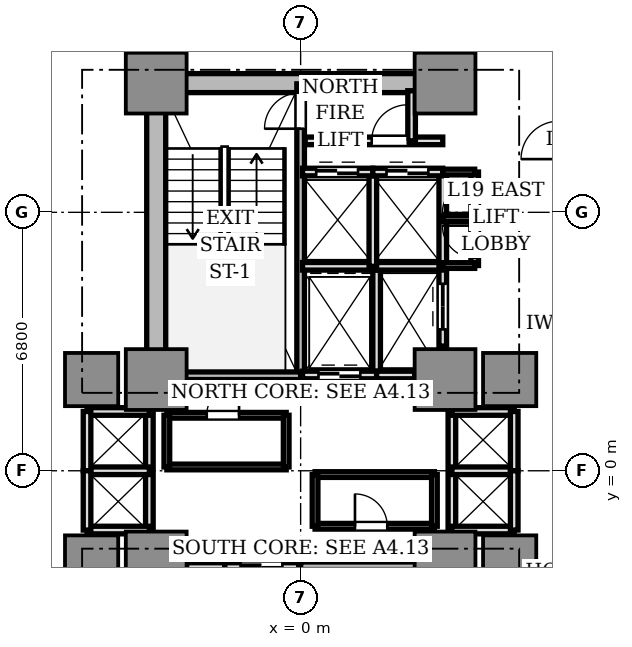
"""IFC4 building model, lengths in metres.
Left out: names, types, materials, properties, quantities, classifications, styles, units other than length and angle.
Written with IfcOpenShell. Run it as: python <this file> out.ifc"""

import sys

from ifc_helpers import new_model, si_unit, direction, frame, frame_2d, origin, origin_2d, place, context, subcontext, project, spatial, rectangle, extrude, source, transform, mapped, element, fill, save


model = new_model("IFC4")
c1 = context("Model", 3, precision=1e-05, world=origin(), true_north=direction((0.0, 1.0)))
c2 = subcontext(c1, "Body", "Model", "MODEL_VIEW")
j1 = project(units=[si_unit("LENGTHUNIT", "METRE"), si_unit("PLANEANGLEUNIT", "RADIAN")], contexts=[c1])
p1 = place(None, origin())
s1 = spatial("IfcSite", under=j1, at=p1, CompositionType="ELEMENT")
p2 = place(p1, origin())
s2 = spatial("IfcBuilding", under=s1, at=p2, CompositionType="ELEMENT")
p3 = place(p2, frame((0.0, 0.0, 71.15)))
s3 = spatial("IfcBuildingStorey", under=s2, at=p3, CompositionType="ELEMENT", Elevation=71.15)
p4 = place(p3, frame((-3.55, 10.2, 0.0), z_axis=(0.0, 0.0, 1.0), x_axis=(1.0, 0.0, 0.0)))
e1 = element("IfcWall", 1, at=p4, inside=s3, PredefinedType="SHEAR", context=c2, shape_type="SweptSolid", body=[
    extrude(rectangle(XDim=7.1, YDim=0.5, at=frame_2d((3.55, 0.0))), origin(), (0.0, 0.0, 1.0), 3.03),
])
p5 = place(p3, frame((-3.8, 2.85, 0.0), z_axis=(0.0, 0.0, 1.0), x_axis=(0.0, 1.0, 0.0)))
e2 = element("IfcWall", 2, at=p5, inside=s3, PredefinedType="SHEAR", context=c2, shape_type="SweptSolid", body=[
    extrude(rectangle(XDim=6.9, YDim=0.5, at=frame_2d((3.45, 0.0))), origin(), (0.0, 0.0, 1.0), 3.03),
])
m1 = source(origin(), c2, "Body", "SweptSolid", [
    extrude(rectangle(XDim=1.6, YDim=1.6, at=origin_2d()), origin(), (0.0, 0.0, 1.0), 3.03),
])
for number, where, z_axis, x_axis in (
    (3, (-3.8, 2.4, 0.0), (0.0, 0.0, 1.0), (1.0, 0.0, 0.0)),
    (4, (3.8, 2.4, 0.0), (0.0, 0.0, 1.0), (1.0, 0.0, 0.0)),
    (5, (-3.8, 10.2, 0.0), (0.0, 0.0, 1.0), (1.0, 0.0, 0.0)),
    (6, (3.8, 10.2, 0.0), (0.0, 0.0, 1.0), (1.0, 0.0, 0.0)),
    (7, (-3.8, -2.4, 0.0), (0.0, 0.0, 1.0), (1.0, 0.0, 0.0)),
    (8, (3.8, -2.4, 0.0), (0.0, 0.0, 1.0), (1.0, 0.0, 0.0)),
):
    element("IfcColumn", number, at=place(p3, frame(where, z_axis=z_axis, x_axis=x_axis)), inside=s3, PredefinedType="COLUMN", context=c2, shape_type="MappedRepresentation", body=[
        mapped(m1, transform((0.0, 0.0, 0.0), scale=1.0)),
    ])
m2 = source(origin(), c2, "Body", "SweptSolid", [
    extrude(rectangle(XDim=1.4, YDim=1.4, at=origin_2d()), origin(), (0.0, 0.0, 1.0), 3.03),
])
for number, where, z_axis, x_axis in (
    (9, (5.5, 2.4, 0.0), (0.0, 0.0, 1.0), (1.0, 0.0, 0.0)),
    (10, (-5.5, 2.4, 0.0), (0.0, 0.0, 1.0), (1.0, 0.0, 0.0)),
    (11, (5.5, -2.4, 0.0), (0.0, 0.0, 1.0), (1.0, 0.0, 0.0)),
    (12, (-5.5, -2.4, 0.0), (0.0, 0.0, 1.0), (1.0, 0.0, 0.0)),
):
    element("IfcColumn", number, at=place(p3, frame(where, z_axis=z_axis, x_axis=x_axis)), inside=s3, PredefinedType="COLUMN", context=c2, shape_type="MappedRepresentation", body=[
        mapped(m2, transform((0.0, 0.0, 0.0), scale=1.0)),
    ])
p6 = place(p3, frame((0.0, 2.5, 0.0), z_axis=(0.0, 0.0, 1.0), x_axis=(0.0, 1.0, 0.0)))
e13 = element("IfcWall", 13, at=p6, inside=s3, PredefinedType="SOLIDWALL", context=c2, shape_type="SweptSolid", body=[
    extrude(rectangle(XDim=7.68, YDim=0.2, at=frame_2d((3.84, 0.0))), origin(), (0.0, 0.0, 1.0), 3.03),
])
p7 = place(p6, frame((6.5, 0.0, 0.0)))
e14 = element("IfcOpeningElement", 14, at=p7, cuts=e13, PredefinedType="OPENING", context=c2, shape_type="SweptSolid", body=[
    extrude(rectangle(XDim=0.95, YDim=2.15, at=frame_2d((0.475, 1.075))), frame((0.0, 0.11, 0.0), z_axis=(0.0, -1.0, 0.0), x_axis=(1.0, 0.0, 0.0)), (0.0, 0.0, 1.0), 0.22),
])
p8 = place(p3, frame((-3.72, 2.5, 0.0), z_axis=(0.0, 0.0, 1.0), x_axis=(1.0, 0.0, 0.0)))
e15 = element("IfcWall", 15, at=p8, inside=s3, PredefinedType="SOLIDWALL", context=c2, shape_type="SweptSolid", body=[
    extrude(rectangle(XDim=3.72, YDim=0.2, at=frame_2d((1.86, 0.0))), origin(), (0.0, 0.0, 1.0), 3.03),
])
p9 = place(p3, frame((0.0, -10.18, 0.0), z_axis=(0.0, 0.0, 1.0), x_axis=(0.0, 1.0, 0.0)))
e16 = element("IfcWall", 16, at=p9, inside=s3, PredefinedType="SOLIDWALL", context=c2, shape_type="SweptSolid", body=[
    extrude(rectangle(XDim=7.68, YDim=0.2, at=frame_2d((3.84, 0.0))), origin(), (0.0, 0.0, 1.0), 3.03),
])
p10 = place(p9, frame((0.28, 0.0, 0.0)))
e17 = element("IfcOpeningElement", 17, at=p10, cuts=e16, PredefinedType="OPENING", context=c2, shape_type="SweptSolid", body=[
    extrude(rectangle(XDim=1.1, YDim=2.15, at=frame_2d((0.55, 1.075))), frame((0.0, 0.11, 0.0), z_axis=(0.0, -1.0, 0.0), x_axis=(1.0, 0.0, 0.0)), (0.0, 0.0, 1.0), 0.22),
])
p11 = place(p3, frame((0.0, -2.5, 0.0), z_axis=(0.0, 0.0, 1.0), x_axis=(1.0, 0.0, 0.0)))
e18 = element("IfcWall", 18, at=p11, inside=s3, PredefinedType="SOLIDWALL", context=c2, shape_type="SweptSolid", body=[
    extrude(rectangle(XDim=3.72, YDim=0.2, at=frame_2d((1.86, 0.0))), origin(), (0.0, 0.0, 1.0), 3.03),
])
p12 = place(p3, frame((2.0, 2.5, 0.0), z_axis=(0.0, 0.0, 1.0), x_axis=(0.0, 1.0, 0.0)))
e19 = element("IfcWall", 19, at=p12, inside=s3, PredefinedType="SOLIDWALL", context=c2, shape_type="SweptSolid", body=[
    extrude(rectangle(XDim=2.78, YDim=0.2, at=frame_2d((1.39, 0.0))), origin(), (0.0, 0.0, 1.0), 2.58),
])
p13 = place(p3, frame((0.05, 2.52, 0.0), z_axis=(0.0, 0.0, 1.0), x_axis=(1.0, 0.0, 0.0)))
e20 = element("IfcWall", 20, at=p13, inside=s3, PredefinedType="SOLIDWALL", context=c2, shape_type="SweptSolid", body=[
    extrude(rectangle(XDim=1.95, YDim=0.2, at=frame_2d((0.975, 0.0))), origin(), (0.0, 0.0, 1.0), 2.58),
])
p14 = place(p13, frame((0.42, 0.0, 0.0)))
e21 = element("IfcOpeningElement", 21, at=p14, cuts=e20, PredefinedType="OPENING", context=c2, shape_type="SweptSolid", body=[
    extrude(rectangle(XDim=1.1, YDim=2.2, at=frame_2d((0.55, 1.1))), frame((0.0, 0.11, 0.0), z_axis=(0.0, -1.0, 0.0), x_axis=(1.0, 0.0, 0.0)), (0.0, 0.0, 1.0), 0.22),
])
p15 = place(p3, frame((-2.0, -5.28, 0.0), z_axis=(0.0, 0.0, 1.0), x_axis=(0.0, 1.0, 0.0)))
e22 = element("IfcWall", 22, at=p15, inside=s3, PredefinedType="SOLIDWALL", context=c2, shape_type="SweptSolid", body=[
    extrude(rectangle(XDim=2.78, YDim=0.2, at=frame_2d((1.39, 0.0))), origin(), (0.0, 0.0, 1.0), 2.58),
])
p16 = place(p3, frame((-2.0, -2.52, 0.0), z_axis=(0.0, 0.0, 1.0), x_axis=(1.0, 0.0, 0.0)))
e23 = element("IfcWall", 23, at=p16, inside=s3, PredefinedType="SOLIDWALL", context=c2, shape_type="SweptSolid", body=[
    extrude(rectangle(XDim=1.95, YDim=0.2, at=frame_2d((0.975, 0.0))), origin(), (0.0, 0.0, 1.0), 2.58),
])
p17 = place(p16, frame((0.42, 0.0, 0.0)))
e24 = element("IfcOpeningElement", 24, at=p17, cuts=e23, PredefinedType="OPENING", context=c2, shape_type="SweptSolid", body=[
    extrude(rectangle(XDim=1.1, YDim=2.2, at=frame_2d((0.55, 1.1))), frame((0.0, 0.11, 0.0), z_axis=(0.0, -1.0, 0.0), x_axis=(1.0, 0.0, 0.0)), (0.0, 0.0, 1.0), 0.22),
])
p18 = place(p3, frame((2.0, 2.52, 0.0), z_axis=(0.0, 0.0, 1.0), x_axis=(1.0, 0.0, 0.0)))
e25 = element("IfcWall", 25, at=p18, inside=s3, PredefinedType="SOLIDWALL", context=c2, shape_type="SweptSolid", body=[
    extrude(rectangle(XDim=1.0, YDim=0.2, at=frame_2d((0.5, 0.0))), origin(), (0.0, 0.0, 1.0), 2.58),
])
p19 = place(p3, frame((3.74, 3.28, 0.0), z_axis=(0.0, 0.0, 1.0), x_axis=(0.0, 1.0, 0.0)))
e26 = element("IfcWall", 26, at=p19, inside=s3, PredefinedType="SOLIDWALL", context=c2, shape_type="SweptSolid", body=[
    extrude(rectangle(XDim=2.08, YDim=0.2, at=frame_2d((1.04, 0.0))), origin(), (0.0, 0.0, 1.0), 2.58),
])
p20 = place(p19, frame((0.44, 0.0, 0.0)))
e27 = element("IfcOpeningElement", 27, at=p20, cuts=e26, PredefinedType="OPENING", context=c2, shape_type="SweptSolid", body=[
    extrude(rectangle(XDim=1.2, YDim=2.2, at=frame_2d((0.6, 1.1))), frame((0.0, 0.11, 0.0), z_axis=(0.0, -1.0, 0.0), x_axis=(1.0, 0.0, 0.0)), (0.0, 0.0, 1.0), 0.22),
])
p21 = place(p3, frame((-3.0, -2.52, 0.0), z_axis=(0.0, 0.0, 1.0), x_axis=(1.0, 0.0, 0.0)))
e28 = element("IfcWall", 28, at=p21, inside=s3, PredefinedType="SOLIDWALL", context=c2, shape_type="SweptSolid", body=[
    extrude(rectangle(XDim=1.0, YDim=0.2, at=frame_2d((0.5, 0.0))), origin(), (0.0, 0.0, 1.0), 2.58),
])
p22 = place(p3, frame((0.05, 5.38, 0.0), z_axis=(0.0, 0.0, 1.0), x_axis=(1.0, 0.0, 0.0)))
e29 = element("IfcWall", 29, at=p22, inside=s3, PredefinedType="SOLIDWALL", context=c2, shape_type="SweptSolid", body=[
    extrude(rectangle(XDim=3.69, YDim=0.2, at=frame_2d((1.845, 0.0))), origin(), (0.0, 0.0, 1.0), 2.58),
])
p23 = place(p3, frame((1.9, 5.38, 0.0), z_axis=(0.0, 0.0, 1.0), x_axis=(0.0, 1.0, 0.0)))
e30 = element("IfcWall", 30, at=p23, inside=s3, PredefinedType="SOLIDWALL", context=c2, shape_type="SweptSolid", body=[
    extrude(rectangle(XDim=2.48, YDim=0.2, at=frame_2d((1.24, 0.0))), origin(), (0.0, 0.0, 1.0), 2.58),
])
p24 = place(p3, frame((0.05, 7.86, 0.0), z_axis=(0.0, 0.0, 1.0), x_axis=(1.0, 0.0, 0.0)))
e31 = element("IfcWall", 31, at=p24, inside=s3, PredefinedType="SOLIDWALL", context=c2, shape_type="SweptSolid", body=[
    extrude(rectangle(XDim=1.85, YDim=0.2, at=frame_2d((0.925, 0.0))), origin(), (0.0, 0.0, 1.0), 2.58),
])
p25 = place(p24, frame((0.36, 0.0, 0.0)))
e32 = element("IfcOpeningElement", 32, at=p25, cuts=e31, PredefinedType="OPENING", context=c2, shape_type="SweptSolid", body=[
    extrude(rectangle(XDim=1.1, YDim=2.2, at=frame_2d((0.55, 1.1))), frame((0.0, 0.11, 0.0), z_axis=(0.0, -1.0, 0.0), x_axis=(1.0, 0.0, 0.0)), (0.0, 0.0, 1.0), 0.22),
])
p26 = place(p3, frame((3.74, 5.38, 0.0), z_axis=(0.0, 0.0, 1.0), x_axis=(0.0, 1.0, 0.0)))
e33 = element("IfcWall", 33, at=p26, inside=s3, PredefinedType="SOLIDWALL", context=c2, shape_type="SweptSolid", body=[
    extrude(rectangle(XDim=2.48, YDim=0.2, at=frame_2d((1.24, 0.0))), origin(), (0.0, 0.0, 1.0), 2.58),
])
p27 = place(p3, frame((1.9, 7.86, 0.0), z_axis=(0.0, 0.0, 1.0), x_axis=(1.0, 0.0, 0.0)))
e34 = element("IfcWall", 34, at=p27, inside=s3, PredefinedType="SOLIDWALL", context=c2, shape_type="SweptSolid", body=[
    extrude(rectangle(XDim=1.84, YDim=0.2, at=frame_2d((0.92, 0.0))), origin(), (0.0, 0.0, 1.0), 2.58),
])
p28 = place(p27, frame((0.36, 0.0, 0.0)))
e35 = element("IfcOpeningElement", 35, at=p28, cuts=e34, PredefinedType="OPENING", context=c2, shape_type="SweptSolid", body=[
    extrude(rectangle(XDim=1.1, YDim=2.2, at=frame_2d((0.55, 1.1))), frame((0.0, 0.11, 0.0), z_axis=(0.0, -1.0, 0.0), x_axis=(1.0, 0.0, 0.0)), (0.0, 0.0, 1.0), 0.22),
])
p29 = place(p3, frame((3.98, -1.56, 0.0), z_axis=(0.0, 0.0, 1.0), x_axis=(0.0, 1.0, 0.0)))
e36 = element("IfcWall", 36, at=p29, inside=s3, PredefinedType="SOLIDWALL", context=c2, shape_type="SweptSolid", body=[
    extrude(rectangle(XDim=3.12, YDim=0.2, at=frame_2d((1.56, 0.0))), origin(), (0.0, 0.0, 1.0), 2.1),
])
for number, where, z_axis, x_axis in (
    (37, (3.98, 1.56, 0.0), (0.0, 0.0, 1.0), (1.0, 0.0, 0.0)),
    (38, (3.98, -1.56, 0.0), (0.0, 0.0, 1.0), (1.0, 0.0, 0.0)),
    (39, (3.98, 0.0, 0.0), (0.0, 0.0, 1.0), (1.0, 0.0, 0.0)),
):
    element("IfcWall", number, at=place(p3, frame(where, z_axis=z_axis, x_axis=x_axis)), inside=s3, PredefinedType="SOLIDWALL", context=c2, shape_type="SweptSolid", body=[
        extrude(rectangle(XDim=1.64, YDim=0.2, at=frame_2d((0.82, 0.0))), origin(), (0.0, 0.0, 1.0), 2.58),
    ])
for number, where, z_axis, x_axis in (
    (40, (5.62, 0.0, 0.0), (0.0, 0.0, 1.0), (0.0, 1.0, 0.0)),
    (41, (5.62, -1.56, 0.0), (0.0, 0.0, 1.0), (0.0, 1.0, 0.0)),
):
    element("IfcWall", number, at=place(p3, frame(where, z_axis=z_axis, x_axis=x_axis)), inside=s3, PredefinedType="SOLIDWALL", context=c2, shape_type="SweptSolid", body=[
        extrude(rectangle(XDim=1.56, YDim=0.2, at=frame_2d((0.78, 0.0))), origin(), (0.0, 0.0, 1.0), 2.58),
    ])
p30 = place(p3, frame((-3.98, -1.56, 0.0), z_axis=(0.0, 0.0, 1.0), x_axis=(0.0, 1.0, 0.0)))
e42 = element("IfcWall", 42, at=p30, inside=s3, PredefinedType="SOLIDWALL", context=c2, shape_type="SweptSolid", body=[
    extrude(rectangle(XDim=3.12, YDim=0.2, at=frame_2d((1.56, 0.0))), origin(), (0.0, 0.0, 1.0), 2.1),
])
for number, where, z_axis, x_axis in (
    (43, (-5.62, 1.56, 0.0), (0.0, 0.0, 1.0), (1.0, 0.0, 0.0)),
    (44, (-5.62, -1.56, 0.0), (0.0, 0.0, 1.0), (1.0, 0.0, 0.0)),
    (45, (-5.62, 0.0, 0.0), (0.0, 0.0, 1.0), (1.0, 0.0, 0.0)),
):
    element("IfcWall", number, at=place(p3, frame(where, z_axis=z_axis, x_axis=x_axis)), inside=s3, PredefinedType="SOLIDWALL", context=c2, shape_type="SweptSolid", body=[
        extrude(rectangle(XDim=1.64, YDim=0.2, at=frame_2d((0.82, 0.0))), origin(), (0.0, 0.0, 1.0), 2.58),
    ])
for number, where, z_axis, x_axis in (
    (46, (-5.62, 0.0, 0.0), (0.0, 0.0, 1.0), (0.0, 1.0, 0.0)),
    (47, (-5.62, -1.56, 0.0), (0.0, 0.0, 1.0), (0.0, 1.0, 0.0)),
):
    element("IfcWall", number, at=place(p3, frame(where, z_axis=z_axis, x_axis=x_axis)), inside=s3, PredefinedType="SOLIDWALL", context=c2, shape_type="SweptSolid", body=[
        extrude(rectangle(XDim=1.56, YDim=0.2, at=frame_2d((0.78, 0.0))), origin(), (0.0, 0.0, 1.0), 2.58),
    ])
p31 = place(p3, frame((0.12, 8.68, 0.0), z_axis=(0.0, 0.0, 1.0), x_axis=(1.0, 0.0, 0.0)))
e48 = element("IfcWall", 48, at=p31, inside=s3, PredefinedType="SOLIDWALL", context=c2, shape_type="SweptSolid", body=[
    extrude(rectangle(XDim=3.62, YDim=0.2, at=frame_2d((1.81, 0.0))), origin(), (0.0, 0.0, 1.0), 2.58),
])
p32 = place(p31, frame((1.75, 0.0, 0.0)))
e49 = element("IfcOpeningElement", 49, at=p32, cuts=e48, PredefinedType="OPENING", context=c2, shape_type="SweptSolid", body=[
    extrude(rectangle(XDim=0.95, YDim=2.15, at=frame_2d((0.475, 1.075))), frame((0.0, 0.11, 0.0), z_axis=(0.0, -1.0, 0.0), x_axis=(1.0, 0.0, 0.0)), (0.0, 0.0, 1.0), 0.22),
])
p33 = place(p3, frame((2.92, 8.68, 0.0), z_axis=(0.0, 0.0, 1.0), x_axis=(0.0, 1.0, 0.0)))
e50 = element("IfcWall", 50, at=p33, inside=s3, PredefinedType="SOLIDWALL", context=c2, shape_type="SweptSolid", body=[
    extrude(rectangle(XDim=1.32, YDim=0.2, at=frame_2d((0.66, 0.0))), origin(), (0.0, 0.0, 1.0), 2.58),
])
p34 = place(p3, frame((4.58, 5.4, 0.0), z_axis=(0.0, 0.0, 1.0), x_axis=(0.0, 1.0, 0.0)))
e51 = element("IfcWall", 51, at=p34, inside=s3, PredefinedType="SOLIDWALL", context=c2, shape_type="SweptSolid", body=[
    extrude(rectangle(XDim=2.46, YDim=0.2, at=frame_2d((1.23, 0.0))), origin(), (0.0, 0.0, 1.0), 2.58),
])
p35 = place(p34, frame((0.2, 0.0, 0.0)))
e52 = element("IfcOpeningElement", 52, at=p35, cuts=e51, PredefinedType="OPENING", context=c2, shape_type="SweptSolid", body=[
    extrude(rectangle(XDim=0.85, YDim=2.1, at=frame_2d((0.425, 1.05))), frame((0.0, 0.11, 0.0), z_axis=(0.0, -1.0, 0.0), x_axis=(1.0, 0.0, 0.0)), (0.0, 0.0, 1.0), 0.22),
])
p36 = place(p34, frame((1.38, 0.0, 0.0)))
e53 = element("IfcOpeningElement", 53, at=p36, cuts=e51, PredefinedType="OPENING", context=c2, shape_type="SweptSolid", body=[
    extrude(rectangle(XDim=0.85, YDim=2.1, at=frame_2d((0.425, 1.05))), frame((0.0, 0.11, 0.0), z_axis=(0.0, -1.0, 0.0), x_axis=(1.0, 0.0, 0.0)), (0.0, 0.0, 1.0), 0.22),
])
for number, where, z_axis, x_axis in (
    (54, (3.74, 5.4, 0.0), (0.0, 0.0, 1.0), (1.0, 0.0, 0.0)),
    (55, (3.74, 7.86, 0.0), (0.0, 0.0, 1.0), (1.0, 0.0, 0.0)),
    (56, (3.74, 6.63, 0.0), (0.0, 0.0, 1.0), (1.0, 0.0, 0.0)),
):
    element("IfcWall", number, at=place(p3, frame(where, z_axis=z_axis, x_axis=x_axis)), inside=s3, PredefinedType="PARTITIONING", context=c2, shape_type="SweptSolid", body=[
        extrude(rectangle(XDim=0.84, YDim=0.15, at=frame_2d((0.42, 0.0))), origin(), (0.0, 0.0, 1.0), 2.58),
    ])
p37 = place(p3, frame((-3.52, 0.1, 0.0), z_axis=(0.0, 0.0, 1.0), x_axis=(1.0, 0.0, 0.0)))
e57 = element("IfcWall", 57, at=p37, inside=s3, PredefinedType="PARTITIONING", context=c2, shape_type="SweptSolid", body=[
    extrude(rectangle(XDim=3.14, YDim=0.15, at=frame_2d((1.57, 0.0))), origin(), (0.0, 0.0, 1.0), 2.58),
])
p38 = place(p3, frame((-3.52, 1.46, 0.0), z_axis=(0.0, 0.0, 1.0), x_axis=(1.0, 0.0, 0.0)))
e58 = element("IfcWall", 58, at=p38, inside=s3, PredefinedType="PARTITIONING", context=c2, shape_type="SweptSolid", body=[
    extrude(rectangle(XDim=3.14, YDim=0.15, at=frame_2d((1.57, 0.0))), origin(), (0.0, 0.0, 1.0), 2.58),
])
p39 = place(p38, frame((1.05, 0.0, 0.0)))
e59 = element("IfcOpeningElement", 59, at=p39, cuts=e58, PredefinedType="OPENING", context=c2, shape_type="SweptSolid", body=[
    extrude(rectangle(XDim=0.85, YDim=2.1, at=frame_2d((0.425, 1.05))), frame((0.0, 0.085, 0.0), z_axis=(0.0, -1.0, 0.0), x_axis=(1.0, 0.0, 0.0)), (0.0, 0.0, 1.0), 0.17),
])
p40 = place(p3, frame((-3.52, 0.1, 0.0), z_axis=(0.0, 0.0, 1.0), x_axis=(0.0, 1.0, 0.0)))
e60 = element("IfcWall", 60, at=p40, inside=s3, PredefinedType="PARTITIONING", context=c2, shape_type="SweptSolid", body=[
    extrude(rectangle(XDim=1.36, YDim=0.15, at=frame_2d((0.68, 0.0))), origin(), (0.0, 0.0, 1.0), 2.1),
])
p41 = place(p3, frame((-0.38, 0.1, 0.0), z_axis=(0.0, 0.0, 1.0), x_axis=(0.0, 1.0, 0.0)))
e61 = element("IfcWall", 61, at=p41, inside=s3, PredefinedType="PARTITIONING", context=c2, shape_type="SweptSolid", body=[
    extrude(rectangle(XDim=1.36, YDim=0.15, at=frame_2d((0.68, 0.0))), origin(), (0.0, 0.0, 1.0), 2.58),
])
p42 = place(p3, frame((0.38, -0.1, 0.0), z_axis=(0.0, 0.0, 1.0), x_axis=(1.0, 0.0, 0.0)))
e62 = element("IfcWall", 62, at=p42, inside=s3, PredefinedType="PARTITIONING", context=c2, shape_type="SweptSolid", body=[
    extrude(rectangle(XDim=3.14, YDim=0.15, at=frame_2d((1.57, 0.0))), origin(), (0.0, 0.0, 1.0), 2.58),
])
p43 = place(p3, frame((0.38, -1.46, 0.0), z_axis=(0.0, 0.0, 1.0), x_axis=(1.0, 0.0, 0.0)))
e63 = element("IfcWall", 63, at=p43, inside=s3, PredefinedType="PARTITIONING", context=c2, shape_type="SweptSolid", body=[
    extrude(rectangle(XDim=3.14, YDim=0.15, at=frame_2d((1.57, 0.0))), origin(), (0.0, 0.0, 1.0), 2.58),
])
p44 = place(p43, frame((1.05, 0.0, 0.0)))
e64 = element("IfcOpeningElement", 64, at=p44, cuts=e63, PredefinedType="OPENING", context=c2, shape_type="SweptSolid", body=[
    extrude(rectangle(XDim=0.85, YDim=2.1, at=frame_2d((0.425, 1.05))), frame((0.0, 0.085, 0.0), z_axis=(0.0, -1.0, 0.0), x_axis=(1.0, 0.0, 0.0)), (0.0, 0.0, 1.0), 0.17),
])
p45 = place(p3, frame((0.38, -1.46, 0.0), z_axis=(0.0, 0.0, 1.0), x_axis=(0.0, 1.0, 0.0)))
e65 = element("IfcWall", 65, at=p45, inside=s3, PredefinedType="PARTITIONING", context=c2, shape_type="SweptSolid", body=[
    extrude(rectangle(XDim=1.36, YDim=0.15, at=frame_2d((0.68, 0.0))), origin(), (0.0, 0.0, 1.0), 2.58),
])
p46 = place(p3, frame((3.52, -1.46, 0.0), z_axis=(0.0, 0.0, 1.0), x_axis=(0.0, 1.0, 0.0)))
e66 = element("IfcWall", 66, at=p46, inside=s3, PredefinedType="PARTITIONING", context=c2, shape_type="SweptSolid", body=[
    extrude(rectangle(XDim=1.36, YDim=0.15, at=frame_2d((0.68, 0.0))), origin(), (0.0, 0.0, 1.0), 2.1),
])
m3 = source(origin(), c2, "Body", "SweptSolid", [
    extrude(rectangle(XDim=1.1, YDim=0.05, at=origin_2d()), origin(), (0.0, 0.0, 1.0), 2.2),
])
p47 = place(p14, frame((0.55, 0.0, 0.0)))
e67 = element("IfcDoor", 67, at=p47, inside=s3, OperationType="DOUBLE_DOOR_SLIDING", PredefinedType="DOOR", context=c2, shape_type="MappedRepresentation", body=[
    mapped(m3, transform((0.0, 0.0, 0.0), scale=1.0)),
])
fill(e21, e67)
p48 = place(p17, frame((0.55, 0.0, 0.0)))
e68 = element("IfcDoor", 68, at=p48, inside=s3, OperationType="DOUBLE_DOOR_SLIDING", PredefinedType="DOOR", context=c2, shape_type="MappedRepresentation", body=[
    mapped(m3, transform((0.0, 0.0, 0.0), scale=1.0)),
])
fill(e24, e68)
m4 = source(origin(), c2, "Body", "SweptSolid", [
    extrude(rectangle(XDim=1.2, YDim=0.05, at=origin_2d()), origin(), (0.0, 0.0, 1.0), 2.2),
])
p49 = place(p20, frame((0.6, 0.0, 0.0)))
e69 = element("IfcDoor", 69, at=p49, inside=s3, OperationType="DOUBLE_DOOR_SLIDING", PredefinedType="DOOR", context=c2, shape_type="MappedRepresentation", body=[
    mapped(m4, transform((0.0, 0.0, 0.0), scale=1.0)),
])
fill(e27, e69)
p50 = place(p25, frame((0.55, 0.0, 0.0)))
e70 = element("IfcDoor", 70, at=p50, inside=s3, OperationType="DOUBLE_DOOR_SLIDING", PredefinedType="DOOR", context=c2, shape_type="MappedRepresentation", body=[
    mapped(m3, transform((0.0, 0.0, 0.0), scale=1.0)),
])
fill(e32, e70)
p51 = place(p28, frame((0.55, 0.0, 0.0)))
e71 = element("IfcDoor", 71, at=p51, inside=s3, OperationType="DOUBLE_DOOR_SLIDING", PredefinedType="DOOR", context=c2, shape_type="MappedRepresentation", body=[
    mapped(m3, transform((0.0, 0.0, 0.0), scale=1.0)),
])
fill(e35, e71)
m5 = source(origin(), c2, "Body", "SweptSolid", [
    extrude(rectangle(XDim=0.95, YDim=0.05, at=origin_2d()), origin(), (0.0, 0.0, 1.0), 2.15),
])
p52 = place(p7, frame((0.475, 0.0, 0.0)))
e72 = element("IfcDoor", 72, at=p52, inside=s3, OperationType="SINGLE_SWING_LEFT", PredefinedType="DOOR", context=c2, shape_type="MappedRepresentation", body=[
    mapped(m5, transform((0.0, 0.0, 0.0), scale=1.0)),
])
fill(e14, e72)
p53 = place(p32, frame((0.475, 0.0, 0.0)))
e73 = element("IfcDoor", 73, at=p53, inside=s3, OperationType="SINGLE_SWING_RIGHT", PredefinedType="DOOR", context=c2, shape_type="MappedRepresentation", body=[
    mapped(m5, transform((0.0, 0.0, 0.0), scale=1.0)),
])
fill(e49, e73)
m6 = source(origin(), c2, "Body", "SweptSolid", [
    extrude(rectangle(XDim=0.85, YDim=0.05, at=origin_2d()), origin(), (0.0, 0.0, 1.0), 2.1),
])
p54 = place(p35, frame((0.425, 0.0, 0.0)))
e74 = element("IfcDoor", 74, at=p54, inside=s3, OperationType="SINGLE_SWING_RIGHT", PredefinedType="DOOR", context=c2, shape_type="MappedRepresentation", body=[
    mapped(m6, transform((0.0, 0.0, 0.0), scale=1.0)),
])
fill(e52, e74)
p55 = place(p36, frame((0.425, 0.0, 0.0)))
e75 = element("IfcDoor", 75, at=p55, inside=s3, OperationType="SINGLE_SWING_LEFT", PredefinedType="DOOR", context=c2, shape_type="MappedRepresentation", body=[
    mapped(m6, transform((0.0, 0.0, 0.0), scale=1.0)),
])
fill(e53, e75)
p56 = place(p39, frame((0.425, 0.0, 0.0)))
e76 = element("IfcDoor", 76, at=p56, inside=s3, OperationType="SINGLE_SWING_RIGHT", PredefinedType="DOOR", context=c2, shape_type="MappedRepresentation", body=[
    mapped(m6, transform((0.0, 0.0, 0.0), scale=1.0)),
])
fill(e59, e76)
p57 = place(p44, frame((0.425, 0.0, 0.0)))
e77 = element("IfcDoor", 77, at=p57, inside=s3, OperationType="SINGLE_SWING_LEFT", PredefinedType="DOOR", context=c2, shape_type="MappedRepresentation", body=[
    mapped(m6, transform((0.0, 0.0, 0.0), scale=1.0)),
])
fill(e64, e77)
save(model, sys.argv[1])
